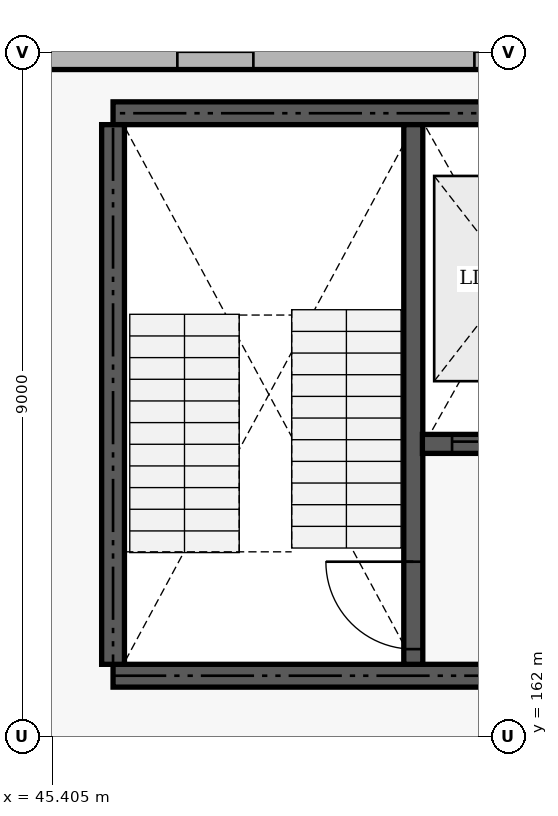
"""IFC4 building model, lengths in metres.
Left out: names, types, materials, properties, quantities, classifications, styles, units other than length and angle.
Written with IfcOpenShell. Run it as: python <this file> out.ifc"""

import sys

from ifc_helpers import new_model, si_unit, direction, frame, frame_2d, origin, place, context, subcontext, project, spatial, rectangle, extrude, element, fill, save


model = new_model("IFC4")
c1 = context("Model", 3, precision=1e-05, world=origin(), true_north=direction((0.0, 1.0)))
c2 = subcontext(c1, "Body", "Model", "MODEL_VIEW")
j1 = project(units=[si_unit("LENGTHUNIT", "METRE"), si_unit("PLANEANGLEUNIT", "RADIAN")], contexts=[c1])
p1 = place(None, origin())
s1 = spatial("IfcSite", under=j1, at=p1, CompositionType="ELEMENT")
p2 = place(p1, origin())
s2 = spatial("IfcBuilding", under=s1, at=p2, CompositionType="ELEMENT")
p3 = place(p2, frame((0.0, 0.0, 9.6)))
s3 = spatial("IfcBuildingStorey", under=s2, at=p3, CompositionType="ELEMENT", Elevation=9.6)
p4 = place(p3, frame((45.06, 171.0, 0.0), z_axis=(0.0, 0.0, 1.0), x_axis=(1.0, 0.0, 0.0)))
e1 = element("IfcWall", 1, at=p4, inside=s3, PredefinedType="SOLIDWALL", context=c2, shape_type="SweptSolid", body=[
    extrude(rectangle(XDim=8.88, YDim=0.45, at=frame_2d((4.44, 0.0))), origin(), (0.0, 0.0, 1.0), 3.15),
])
p5 = place(p4, frame((1.986, 0.0, 0.9)))
e2 = element("IfcOpeningElement", 2, at=p5, cuts=e1, PredefinedType="OPENING", context=c2, shape_type="SweptSolid", body=[
    extrude(rectangle(XDim=1.0, YDim=1.5, at=frame_2d((0.5, 0.75))), frame((0.0, 0.235, 0.0), z_axis=(0.0, -1.0, 0.0), x_axis=(1.0, 0.0, 0.0)), (0.0, 0.0, 1.0), 0.47),
])
p6 = place(p4, frame((5.894, 0.0, 0.9)))
e3 = element("IfcOpeningElement", 3, at=p6, cuts=e1, PredefinedType="OPENING", context=c2, shape_type="SweptSolid", body=[
    extrude(rectangle(XDim=1.0, YDim=1.5, at=frame_2d((0.5, 0.75))), frame((0.0, 0.235, 0.0), z_axis=(0.0, -1.0, 0.0), x_axis=(1.0, 0.0, 0.0)), (0.0, 0.0, 1.0), 0.47),
])
for number, where, z_axis, x_axis in (
    (4, (46.2, 162.8, 0.0), (0.0, 0.0, 1.0), (1.0, 0.0, 0.0)),
    (5, (46.2, 170.2, 0.0), (0.0, 0.0, 1.0), (1.0, 0.0, 0.0)),
):
    element("IfcWall", number, at=place(p3, frame(where, z_axis=z_axis, x_axis=x_axis)), inside=s3, PredefinedType="SHEAR", context=c2, shape_type="SweptSolid", body=[
        extrude(rectangle(XDim=6.6, YDim=0.3, at=frame_2d((3.3, 0.0))), origin(), (0.0, 0.0, 1.0), 3.9),
    ])
p7 = place(p3, frame((46.2, 162.95, 0.0), z_axis=(0.0, 0.0, 1.0), x_axis=(0.0, 1.0, 0.0)))
e6 = element("IfcWall", 6, at=p7, inside=s3, PredefinedType="SHEAR", context=c2, shape_type="SweptSolid", body=[
    extrude(rectangle(XDim=7.1, YDim=0.3, at=frame_2d((3.55, 0.0))), origin(), (0.0, 0.0, 1.0), 3.9),
])
p8 = place(p3, frame((50.15, 162.95, 0.0), z_axis=(0.0, 0.0, 1.0), x_axis=(0.0, 1.0, 0.0)))
e7 = element("IfcWall", 7, at=p8, inside=s3, PredefinedType="SHEAR", context=c2, shape_type="SweptSolid", body=[
    extrude(rectangle(XDim=7.1, YDim=0.25, at=frame_2d((3.55, 0.0))), origin(), (0.0, 0.0, 1.0), 3.9),
])
p9 = place(p8, frame((0.2, 0.0, 0.0)))
e8 = element("IfcOpeningElement", 8, at=p9, cuts=e7, PredefinedType="OPENING", context=c2, shape_type="SweptSolid", body=[
    extrude(rectangle(XDim=1.15, YDim=2.15, at=frame_2d((0.575, 1.075))), frame((0.0, 0.135, 0.0), z_axis=(0.0, -1.0, 0.0), x_axis=(1.0, 0.0, 0.0)), (0.0, 0.0, 1.0), 0.27),
])
p10 = place(p3, frame((50.27, 165.85, 0.0), z_axis=(0.0, 0.0, 1.0), x_axis=(1.0, 0.0, 0.0)))
e9 = element("IfcWall", 9, at=p10, inside=s3, PredefinedType="SHEAR", context=c2, shape_type="SweptSolid", body=[
    extrude(rectangle(XDim=2.38, YDim=0.25, at=frame_2d((1.19, 0.0))), origin(), (0.0, 0.0, 1.0), 3.9),
])
p11 = place(p10, frame((0.39, 0.0, 0.0)))
e10 = element("IfcOpeningElement", 10, at=p11, cuts=e9, PredefinedType="OPENING", context=c2, shape_type="SweptSolid", body=[
    extrude(rectangle(XDim=1.6, YDim=2.3, at=frame_2d((0.8, 1.15))), frame((0.0, 0.135, 0.0), z_axis=(0.0, -1.0, 0.0), x_axis=(1.0, 0.0, 0.0)), (0.0, 0.0, 1.0), 0.27),
])
p12 = place(p5, origin())
e11 = element("IfcWindow", 11, at=p12, inside=s3, PartitioningType="SINGLE_PANEL", PredefinedType="WINDOW", context=c2, shape_type="SweptSolid", body=[
    extrude(rectangle(XDim=1.0, YDim=1.5, at=frame_2d((0.5, 0.75))), frame((0.0, 0.03, 0.0), z_axis=(0.0, -1.0, 0.0), x_axis=(1.0, 0.0, 0.0)), (0.0, 0.0, 1.0), 0.06),
])
fill(e2, e11)
p13 = place(p6, origin())
e12 = element("IfcWindow", 12, at=p13, inside=s3, PartitioningType="SINGLE_PANEL", PredefinedType="WINDOW", context=c2, shape_type="SweptSolid", body=[
    extrude(rectangle(XDim=1.0, YDim=1.5, at=frame_2d((0.5, 0.75))), frame((0.0, 0.03, 0.0), z_axis=(0.0, -1.0, 0.0), x_axis=(1.0, 0.0, 0.0)), (0.0, 0.0, 1.0), 0.06),
])
fill(e3, e12)
p14 = place(p9, frame((1.15, 0.0, 0.0), z_axis=(0.0, 0.0, 1.0), x_axis=(-1.0, 0.0, 0.0)))
e13 = element("IfcDoor", 13, at=p14, inside=s3, OperationType="SINGLE_SWING_RIGHT", PredefinedType="DOOR", context=c2, shape_type="SweptSolid", body=[
    extrude(rectangle(XDim=1.15, YDim=2.15, at=frame_2d((0.575, 1.075))), frame((0.0, 0.025, 0.0), z_axis=(0.0, -1.0, 0.0), x_axis=(1.0, 0.0, 0.0)), (0.0, 0.0, 1.0), 0.05),
])
fill(e8, e13)
p15 = place(p11, origin())
e14 = element("IfcDoor", 14, at=p15, inside=s3, OperationType="SLIDING_TO_LEFT", PredefinedType="DOOR", context=c2, shape_type="SweptSolid", body=[
    extrude(rectangle(XDim=1.6, YDim=2.3, at=frame_2d((0.8, 1.15))), frame((0.0, 0.025, 0.0), z_axis=(0.0, -1.0, 0.0), x_axis=(1.0, 0.0, 0.0)), (0.0, 0.0, 1.0), 0.05),
])
fill(e10, e14)
save(model, sys.argv[1])
